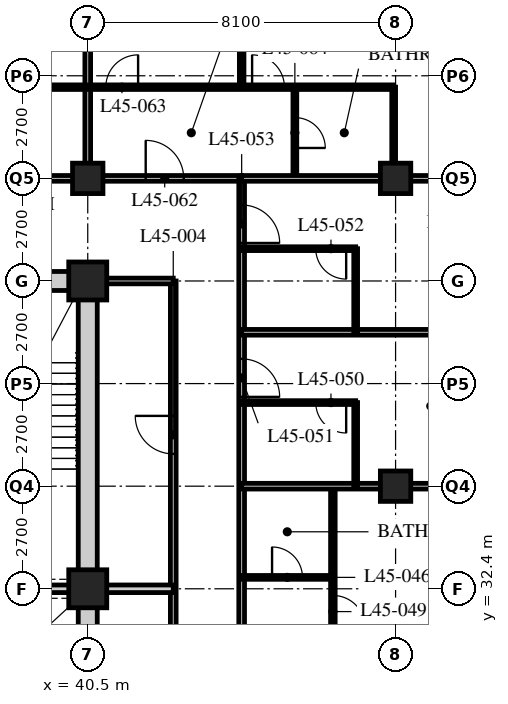
"""IFC4 building model, lengths in metres.
Left out: names, types, materials, properties, quantities, classifications, styles, units other than length and angle.
Written with IfcOpenShell. Run it as: python <this file> out.ifc"""

import sys

from ifc_helpers import new_model, si_unit, direction, frame, frame_2d, origin, origin_2d, place, context, subcontext, project, spatial, rectangle, hollow_rectangle, extrude, element, fill, save


model = new_model("IFC4")
c1 = context("Model", 3, precision=1e-05, world=origin(), true_north=direction((0.0, 1.0)))
c2 = subcontext(c1, "Body", "Model", "MODEL_VIEW")
j1 = project(units=[si_unit("LENGTHUNIT", "METRE"), si_unit("PLANEANGLEUNIT", "RADIAN")], contexts=[c1])
p1 = place(None, origin())
s1 = spatial("IfcSite", under=j1, at=p1, CompositionType="ELEMENT")
p2 = place(p1, origin())
s2 = spatial("IfcBuilding", under=s1, at=p2, CompositionType="ELEMENT")
p3 = place(p2, frame((0.0, 0.0, 177.6)))
s3 = spatial("IfcBuildingStorey", under=s2, at=p3, CompositionType="ELEMENT", Elevation=177.6)
for number, where, z_axis, x_axis in (
    (1, (40.5, 32.4, 0.0), (0.0, 0.0, 1.0), (1.0, 0.0, 0.0)),
    (2, (40.5, 40.5, 0.0), (0.0, 0.0, 1.0), (1.0, 0.0, 0.0)),
):
    element("IfcColumn", number, at=place(p3, frame(where, z_axis=z_axis, x_axis=x_axis)), inside=s3, PredefinedType="COLUMN", context=c2, shape_type="SweptSolid", body=[
        extrude(hollow_rectangle(XDim=1.0, YDim=1.0, WallThickness=0.1, at=origin_2d()), origin(), (0.0, 0.0, 1.0), 3.6),
    ])
for number, where, z_axis, x_axis in (
    (3, (40.5, 43.2, 0.0), (0.0, 0.0, 1.0), (1.0, 0.0, 0.0)),
    (4, (48.6, 35.1, 0.0), (0.0, 0.0, 1.0), (1.0, 0.0, 0.0)),
    (5, (48.6, 43.2, 0.0), (0.0, 0.0, 1.0), (1.0, 0.0, 0.0)),
):
    element("IfcColumn", number, at=place(p3, frame(where, z_axis=z_axis, x_axis=x_axis)), inside=s3, PredefinedType="COLUMN", context=c2, shape_type="SweptSolid", body=[
        extrude(hollow_rectangle(XDim=0.8, YDim=0.8, WallThickness=0.08, at=origin_2d()), origin(), (0.0, 0.0, 1.0), 3.6),
    ])
p4 = place(p3, frame((12.15, 43.2, 0.0), z_axis=(0.0, 0.0, 1.0), x_axis=(1.0, 0.0, 0.0)))
e6 = element("IfcWall", 6, at=p4, inside=s3, PredefinedType="PARTITIONING", context=c2, shape_type="SweptSolid", body=[
    extrude(rectangle(XDim=32.4, YDim=0.15, at=frame_2d((16.2, 0.0))), origin(), (0.0, 0.0, 1.0), 2.778),
])
p5 = place(p4, frame((4.95, 0.0, 0.0)))
e7 = element("IfcOpeningElement", 7, at=p5, cuts=e6, PredefinedType="OPENING", context=c2, shape_type="SweptSolid", body=[
    extrude(rectangle(XDim=1.0, YDim=2.1, at=frame_2d((0.5, 1.05))), frame((0.0, 0.085, 0.0), z_axis=(0.0, -1.0, 0.0), x_axis=(1.0, 0.0, 0.0)), (0.0, 0.0, 1.0), 0.17),
])
p6 = place(p4, frame((13.05, 0.0, 0.0)))
e8 = element("IfcOpeningElement", 8, at=p6, cuts=e6, PredefinedType="OPENING", context=c2, shape_type="SweptSolid", body=[
    extrude(rectangle(XDim=1.0, YDim=2.1, at=frame_2d((0.5, 1.05))), frame((0.0, 0.085, 0.0), z_axis=(0.0, -1.0, 0.0), x_axis=(1.0, 0.0, 0.0)), (0.0, 0.0, 1.0), 0.17),
])
p7 = place(p4, frame((21.15, 0.0, 0.0)))
e9 = element("IfcOpeningElement", 9, at=p7, cuts=e6, PredefinedType="OPENING", context=c2, shape_type="SweptSolid", body=[
    extrude(rectangle(XDim=1.0, YDim=2.1, at=frame_2d((0.5, 1.05))), frame((0.0, 0.085, 0.0), z_axis=(0.0, -1.0, 0.0), x_axis=(1.0, 0.0, 0.0)), (0.0, 0.0, 1.0), 0.17),
])
p8 = place(p4, frame((29.875, 0.0, 0.0)))
e10 = element("IfcOpeningElement", 10, at=p8, cuts=e6, PredefinedType="OPENING", context=c2, shape_type="SweptSolid", body=[
    extrude(rectangle(XDim=1.0, YDim=2.1, at=frame_2d((0.5, 1.05))), frame((0.0, 0.085, 0.0), z_axis=(0.0, -1.0, 0.0), x_axis=(1.0, 0.0, 0.0)), (0.0, 0.0, 1.0), 0.17),
])
p9 = place(p4, frame((1.525, 0.0, 0.0)))
e11 = element("IfcOpeningElement", 11, at=p9, cuts=e6, PredefinedType="OPENING", context=c2, shape_type="SweptSolid", body=[
    extrude(rectangle(XDim=1.0, YDim=2.1, at=frame_2d((0.5, 1.05))), frame((0.0, 0.085, 0.0), z_axis=(0.0, -1.0, 0.0), x_axis=(1.0, 0.0, 0.0)), (0.0, 0.0, 1.0), 0.17),
])
p10 = place(p3, frame((44.55, 18.9, 0.0), z_axis=(0.0, 0.0, 1.0), x_axis=(0.0, 1.0, 0.0)))
e12 = element("IfcWall", 12, at=p10, inside=s3, PredefinedType="PARTITIONING", context=c2, shape_type="SweptSolid", body=[
    extrude(rectangle(XDim=24.3, YDim=0.15, at=frame_2d((12.15, 0.0))), origin(), (0.0, 0.0, 1.0), 3.39),
])
p11 = place(p10, frame((2.35, 0.0, 0.0)))
e13 = element("IfcOpeningElement", 13, at=p11, cuts=e12, PredefinedType="OPENING", context=c2, shape_type="SweptSolid", body=[
    extrude(rectangle(XDim=1.0, YDim=2.1, at=frame_2d((0.5, 1.05))), frame((0.0, 0.085, 0.0), z_axis=(0.0, -1.0, 0.0), x_axis=(1.0, 0.0, 0.0)), (0.0, 0.0, 1.0), 0.17),
])
p12 = place(p10, frame((4.45, 0.0, 0.0)))
e14 = element("IfcOpeningElement", 14, at=p12, cuts=e12, PredefinedType="OPENING", context=c2, shape_type="SweptSolid", body=[
    extrude(rectangle(XDim=1.0, YDim=2.1, at=frame_2d((0.5, 1.05))), frame((0.0, 0.085, 0.0), z_axis=(0.0, -1.0, 0.0), x_axis=(1.0, 0.0, 0.0)), (0.0, 0.0, 1.0), 0.17),
])
p13 = place(p10, frame((18.55, 0.0, 0.0)))
e15 = element("IfcOpeningElement", 15, at=p13, cuts=e12, PredefinedType="OPENING", context=c2, shape_type="SweptSolid", body=[
    extrude(rectangle(XDim=1.0, YDim=2.1, at=frame_2d((0.5, 1.05))), frame((0.0, 0.085, 0.0), z_axis=(0.0, -1.0, 0.0), x_axis=(1.0, 0.0, 0.0)), (0.0, 0.0, 1.0), 0.17),
])
p14 = place(p10, frame((22.6, 0.0, 0.0)))
e16 = element("IfcOpeningElement", 16, at=p14, cuts=e12, PredefinedType="OPENING", context=c2, shape_type="SweptSolid", body=[
    extrude(rectangle(XDim=1.0, YDim=2.1, at=frame_2d((0.5, 1.05))), frame((0.0, 0.085, 0.0), z_axis=(0.0, -1.0, 0.0), x_axis=(1.0, 0.0, 0.0)), (0.0, 0.0, 1.0), 0.17),
])
p15 = place(p3, frame((42.75, 20.7, 0.0), z_axis=(0.0, 0.0, 1.0), x_axis=(0.0, 1.0, 0.0)))
e17 = element("IfcWall", 17, at=p15, inside=s3, PredefinedType="PARTITIONING", context=c2, shape_type="SweptSolid", body=[
    extrude(rectangle(XDim=19.8, YDim=0.15, at=frame_2d((9.9, 0.0))), origin(), (0.0, 0.0, 1.0), 3.39),
])
p16 = place(p15, frame((7.15, 0.0, 0.0)))
e18 = element("IfcOpeningElement", 18, at=p16, cuts=e17, PredefinedType="OPENING", context=c2, shape_type="SweptSolid", body=[
    extrude(rectangle(XDim=1.0, YDim=2.1, at=frame_2d((0.5, 1.05))), frame((0.0, 0.085, 0.0), z_axis=(0.0, -1.0, 0.0), x_axis=(1.0, 0.0, 0.0)), (0.0, 0.0, 1.0), 0.17),
])
p17 = place(p15, frame((15.25, 0.0, 0.0)))
e19 = element("IfcOpeningElement", 19, at=p17, cuts=e17, PredefinedType="OPENING", context=c2, shape_type="SweptSolid", body=[
    extrude(rectangle(XDim=1.0, YDim=2.1, at=frame_2d((0.5, 1.05))), frame((0.0, 0.085, 0.0), z_axis=(0.0, -1.0, 0.0), x_axis=(1.0, 0.0, 0.0)), (0.0, 0.0, 1.0), 0.17),
])
p18 = place(p3, frame((42.75, 40.5, 0.0), z_axis=(0.0, 0.0, 1.0), x_axis=(-1.0, 0.0, 0.0)))
e20 = element("IfcWall", 20, at=p18, inside=s3, PredefinedType="PARTITIONING", context=c2, shape_type="SweptSolid", body=[
    extrude(rectangle(XDim=2.05, YDim=0.15, at=frame_2d((1.025, 0.0))), origin(), (0.0, 0.0, 1.0), 3.39),
])
p19 = place(p3, frame((40.5, 32.4, 0.0), z_axis=(0.0, 0.0, 1.0), x_axis=(1.0, 0.0, 0.0)))
e21 = element("IfcWall", 21, at=p19, inside=s3, PredefinedType="SOLIDWALL", context=c2, shape_type="SweptSolid", body=[
    extrude(rectangle(XDim=2.25, YDim=0.2, at=frame_2d((1.125, 0.0))), origin(), (0.0, 0.0, 1.0), 3.39),
])
p20 = place(p3, frame((46.95, 22.95, 0.0), z_axis=(0.0, 0.0, 1.0), x_axis=(0.0, 1.0, 0.0)))
e22 = element("IfcWall", 22, at=p20, inside=s3, PredefinedType="PARTITIONING", context=c2, shape_type="SweptSolid", body=[
    extrude(rectangle(XDim=12.15, YDim=0.12, at=frame_2d((6.075, 0.0))), origin(), (0.0, 0.0, 1.0), 3.39),
])
p21 = place(p20, frame((0.975, 0.0, 0.0)))
e23 = element("IfcOpeningElement", 23, at=p21, cuts=e22, PredefinedType="OPENING", context=c2, shape_type="SweptSolid", body=[
    extrude(rectangle(XDim=0.85, YDim=2.1, at=frame_2d((0.425, 1.05))), frame((0.0, 0.07, 0.0), z_axis=(0.0, -1.0, 0.0), x_axis=(1.0, 0.0, 0.0)), (0.0, 0.0, 1.0), 0.14),
])
p22 = place(p20, frame((8.425, 0.0, 0.0)))
e24 = element("IfcOpeningElement", 24, at=p22, cuts=e22, PredefinedType="OPENING", context=c2, shape_type="SweptSolid", body=[
    extrude(rectangle(XDim=0.85, YDim=2.1, at=frame_2d((0.425, 1.05))), frame((0.0, 0.07, 0.0), z_axis=(0.0, -1.0, 0.0), x_axis=(1.0, 0.0, 0.0)), (0.0, 0.0, 1.0), 0.14),
])
p23 = place(p3, frame((44.55, 32.7, 0.0), z_axis=(0.0, 0.0, 1.0), x_axis=(1.0, 0.0, 0.0)))
e25 = element("IfcWall", 25, at=p23, inside=s3, PredefinedType="PARTITIONING", context=c2, shape_type="SweptSolid", body=[
    extrude(rectangle(XDim=2.4, YDim=0.1, at=frame_2d((1.2, 0.0))), origin(), (0.0, 0.0, 1.0), 3.39),
])
p24 = place(p23, frame((0.8, 0.0, 0.0)))
e26 = element("IfcOpeningElement", 26, at=p24, cuts=e25, PredefinedType="OPENING", context=c2, shape_type="SweptSolid", body=[
    extrude(rectangle(XDim=0.8, YDim=2.1, at=frame_2d((0.4, 1.05))), frame((0.0, 0.06, 0.0), z_axis=(0.0, -1.0, 0.0), x_axis=(1.0, 0.0, 0.0)), (0.0, 0.0, 1.0), 0.12),
])
p25 = place(p3, frame((44.55, 35.1, 0.0), z_axis=(0.0, 0.0, 1.0), x_axis=(1.0, 0.0, 0.0)))
e27 = element("IfcWall", 27, at=p25, inside=s3, PredefinedType="PARTITIONING", context=c2, shape_type="SweptSolid", body=[
    extrude(rectangle(XDim=11.85, YDim=0.15, at=frame_2d((5.925, 0.0))), origin(), (0.0, 0.0, 1.0), 2.778),
])
p26 = place(p3, frame((47.55, 35.1, 0.0), z_axis=(0.0, 0.0, 1.0), x_axis=(0.0, 1.0, 0.0)))
e28 = element("IfcWall", 28, at=p26, inside=s3, PredefinedType="PARTITIONING", context=c2, shape_type="SweptSolid", body=[
    extrude(rectangle(XDim=2.2, YDim=0.1, at=frame_2d((1.1, 0.0))), origin(), (0.0, 0.0, 1.0), 3.39),
])
p27 = place(p3, frame((44.55, 37.3, 0.0), z_axis=(0.0, 0.0, 1.0), x_axis=(1.0, 0.0, 0.0)))
e29 = element("IfcWall", 29, at=p27, inside=s3, PredefinedType="PARTITIONING", context=c2, shape_type="SweptSolid", body=[
    extrude(rectangle(XDim=3.0, YDim=0.1, at=frame_2d((1.5, 0.0))), origin(), (0.0, 0.0, 1.0), 3.39),
])
p28 = place(p27, frame((1.95, 0.0, 0.0)))
e30 = element("IfcOpeningElement", 30, at=p28, cuts=e29, PredefinedType="OPENING", context=c2, shape_type="SweptSolid", body=[
    extrude(rectangle(XDim=0.8, YDim=2.1, at=frame_2d((0.4, 1.05))), frame((0.0, 0.06, 0.0), z_axis=(0.0, -1.0, 0.0), x_axis=(1.0, 0.0, 0.0)), (0.0, 0.0, 1.0), 0.12),
])
p29 = place(p3, frame((44.55, 39.15, 0.0), z_axis=(0.0, 0.0, 1.0), x_axis=(1.0, 0.0, 0.0)))
e31 = element("IfcWall", 31, at=p29, inside=s3, PredefinedType="PARTITIONING", context=c2, shape_type="SweptSolid", body=[
    extrude(rectangle(XDim=11.85, YDim=0.15, at=frame_2d((5.925, 0.0))), origin(), (0.0, 0.0, 1.0), 3.39),
])
p30 = place(p3, frame((47.55, 39.15, 0.0), z_axis=(0.0, 0.0, 1.0), x_axis=(0.0, 1.0, 0.0)))
e32 = element("IfcWall", 32, at=p30, inside=s3, PredefinedType="PARTITIONING", context=c2, shape_type="SweptSolid", body=[
    extrude(rectangle(XDim=2.2, YDim=0.1, at=frame_2d((1.1, 0.0))), origin(), (0.0, 0.0, 1.0), 3.39),
])
p31 = place(p3, frame((44.55, 41.35, 0.0), z_axis=(0.0, 0.0, 1.0), x_axis=(1.0, 0.0, 0.0)))
e33 = element("IfcWall", 33, at=p31, inside=s3, PredefinedType="PARTITIONING", context=c2, shape_type="SweptSolid", body=[
    extrude(rectangle(XDim=3.0, YDim=0.1, at=frame_2d((1.5, 0.0))), origin(), (0.0, 0.0, 1.0), 3.39),
])
p32 = place(p31, frame((1.95, 0.0, 0.0)))
e34 = element("IfcOpeningElement", 34, at=p32, cuts=e33, PredefinedType="OPENING", context=c2, shape_type="SweptSolid", body=[
    extrude(rectangle(XDim=0.8, YDim=2.1, at=frame_2d((0.4, 1.05))), frame((0.0, 0.06, 0.0), z_axis=(0.0, -1.0, 0.0), x_axis=(1.0, 0.0, 0.0)), (0.0, 0.0, 1.0), 0.12),
])
p33 = place(p3, frame((45.95, 43.2, 0.0), z_axis=(0.0, 0.0, 1.0), x_axis=(0.0, 1.0, 0.0)))
e35 = element("IfcWall", 35, at=p33, inside=s3, PredefinedType="PARTITIONING", context=c2, shape_type="SweptSolid", body=[
    extrude(rectangle(XDim=2.4, YDim=0.1, at=frame_2d((1.2, 0.0))), origin(), (0.0, 0.0, 1.0), 3.39),
])
p34 = place(p33, frame((0.8, 0.0, 0.0)))
e36 = element("IfcOpeningElement", 36, at=p34, cuts=e35, PredefinedType="OPENING", context=c2, shape_type="SweptSolid", body=[
    extrude(rectangle(XDim=0.8, YDim=2.1, at=frame_2d((0.4, 1.05))), frame((0.0, 0.06, 0.0), z_axis=(0.0, -1.0, 0.0), x_axis=(1.0, 0.0, 0.0)), (0.0, 0.0, 1.0), 0.12),
])
p35 = place(p3, frame((48.55, 43.2, 0.0), z_axis=(0.0, 0.0, 1.0), x_axis=(0.0, 1.0, 0.0)))
e37 = element("IfcWall", 37, at=p35, inside=s3, PredefinedType="PARTITIONING", context=c2, shape_type="SweptSolid", body=[
    extrude(rectangle(XDim=2.4, YDim=0.1, at=frame_2d((1.2, 0.0))), origin(), (0.0, 0.0, 1.0), 2.778),
])
p36 = place(p3, frame((44.55, 45.6, 0.0), z_axis=(0.0, 0.0, 1.0), x_axis=(0.0, 1.0, 0.0)))
e38 = element("IfcWall", 38, at=p36, inside=s3, PredefinedType="PARTITIONING", context=c2, shape_type="SweptSolid", body=[
    extrude(rectangle(XDim=13.5, YDim=0.12, at=frame_2d((6.75, 0.0))), origin(), (0.0, 0.0, 1.0), 3.39),
])
p37 = place(p3, frame((44.55, 43.2, 0.0), z_axis=(0.0, 0.0, 1.0), x_axis=(1.0, 0.0, 0.0)))
e39 = element("IfcWall", 39, at=p37, inside=s3, PredefinedType="PARTITIONING", context=c2, shape_type="SweptSolid", body=[
    extrude(rectangle(XDim=11.85, YDim=0.15, at=frame_2d((5.925, 0.0))), origin(), (0.0, 0.0, 1.0), 2.778),
])
p38 = place(p3, frame((40.5, 43.2, 0.0), z_axis=(0.0, 0.0, 1.0), x_axis=(0.0, 1.0, 0.0)))
e40 = element("IfcWall", 40, at=p38, inside=s3, PredefinedType="PARTITIONING", context=c2, shape_type="SweptSolid", body=[
    extrude(rectangle(XDim=15.9, YDim=0.15, at=frame_2d((7.95, 0.0))), origin(), (0.0, 0.0, 1.0), 2.778),
])
p39 = place(p3, frame((8.15, 45.6, 0.0), z_axis=(0.0, 0.0, 1.0), x_axis=(1.0, 0.0, 0.0)))
e41 = element("IfcWall", 41, at=p39, inside=s3, PredefinedType="PARTITIONING", context=c2, shape_type="SweptSolid", body=[
    extrude(rectangle(XDim=40.4, YDim=0.12, at=frame_2d((20.2, 0.0))), origin(), (0.0, 0.0, 1.0), 3.39),
])
p40 = place(p39, frame((9.025, 0.0, 0.0)))
e42 = element("IfcOpeningElement", 42, at=p40, cuts=e41, PredefinedType="OPENING", context=c2, shape_type="SweptSolid", body=[
    extrude(rectangle(XDim=0.85, YDim=2.1, at=frame_2d((0.425, 1.05))), frame((0.0, 0.07, 0.0), z_axis=(0.0, -1.0, 0.0), x_axis=(1.0, 0.0, 0.0)), (0.0, 0.0, 1.0), 0.14),
])
p41 = place(p39, frame((12.425, 0.0, 0.0)))
e43 = element("IfcOpeningElement", 43, at=p41, cuts=e41, PredefinedType="OPENING", context=c2, shape_type="SweptSolid", body=[
    extrude(rectangle(XDim=0.85, YDim=2.1, at=frame_2d((0.425, 1.05))), frame((0.0, 0.07, 0.0), z_axis=(0.0, -1.0, 0.0), x_axis=(1.0, 0.0, 0.0)), (0.0, 0.0, 1.0), 0.14),
])
p42 = place(p39, frame((17.125, 0.0, 0.0)))
e44 = element("IfcOpeningElement", 44, at=p42, cuts=e41, PredefinedType="OPENING", context=c2, shape_type="SweptSolid", body=[
    extrude(rectangle(XDim=0.85, YDim=2.1, at=frame_2d((0.425, 1.05))), frame((0.0, 0.07, 0.0), z_axis=(0.0, -1.0, 0.0), x_axis=(1.0, 0.0, 0.0)), (0.0, 0.0, 1.0), 0.14),
])
p43 = place(p39, frame((20.525, 0.0, 0.0)))
e45 = element("IfcOpeningElement", 45, at=p43, cuts=e41, PredefinedType="OPENING", context=c2, shape_type="SweptSolid", body=[
    extrude(rectangle(XDim=0.85, YDim=2.1, at=frame_2d((0.425, 1.05))), frame((0.0, 0.07, 0.0), z_axis=(0.0, -1.0, 0.0), x_axis=(1.0, 0.0, 0.0)), (0.0, 0.0, 1.0), 0.14),
])
p44 = place(p39, frame((25.225, 0.0, 0.0)))
e46 = element("IfcOpeningElement", 46, at=p44, cuts=e41, PredefinedType="OPENING", context=c2, shape_type="SweptSolid", body=[
    extrude(rectangle(XDim=0.85, YDim=2.1, at=frame_2d((0.425, 1.05))), frame((0.0, 0.07, 0.0), z_axis=(0.0, -1.0, 0.0), x_axis=(1.0, 0.0, 0.0)), (0.0, 0.0, 1.0), 0.14),
])
p45 = place(p39, frame((28.625, 0.0, 0.0)))
e47 = element("IfcOpeningElement", 47, at=p45, cuts=e41, PredefinedType="OPENING", context=c2, shape_type="SweptSolid", body=[
    extrude(rectangle(XDim=0.85, YDim=2.1, at=frame_2d((0.425, 1.05))), frame((0.0, 0.07, 0.0), z_axis=(0.0, -1.0, 0.0), x_axis=(1.0, 0.0, 0.0)), (0.0, 0.0, 1.0), 0.14),
])
p46 = place(p39, frame((32.825, 0.0, 0.0)))
e48 = element("IfcOpeningElement", 48, at=p46, cuts=e41, PredefinedType="OPENING", context=c2, shape_type="SweptSolid", body=[
    extrude(rectangle(XDim=0.85, YDim=2.1, at=frame_2d((0.425, 1.05))), frame((0.0, 0.07, 0.0), z_axis=(0.0, -1.0, 0.0), x_axis=(1.0, 0.0, 0.0)), (0.0, 0.0, 1.0), 0.14),
])
p47 = place(p39, frame((36.675, 0.0, 0.0)))
e49 = element("IfcOpeningElement", 49, at=p47, cuts=e41, PredefinedType="OPENING", context=c2, shape_type="SweptSolid", body=[
    extrude(rectangle(XDim=0.85, YDim=2.1, at=frame_2d((0.425, 1.05))), frame((0.0, 0.07, 0.0), z_axis=(0.0, -1.0, 0.0), x_axis=(1.0, 0.0, 0.0)), (0.0, 0.0, 1.0), 0.14),
])
p48 = place(p39, frame((6.725, 0.0, 0.0)))
e50 = element("IfcOpeningElement", 50, at=p48, cuts=e41, PredefinedType="OPENING", context=c2, shape_type="SweptSolid", body=[
    extrude(rectangle(XDim=0.85, YDim=2.1, at=frame_2d((0.425, 1.05))), frame((0.0, 0.07, 0.0), z_axis=(0.0, -1.0, 0.0), x_axis=(1.0, 0.0, 0.0)), (0.0, 0.0, 1.0), 0.14),
])
p49 = place(p39, frame((2.875, 0.0, 0.0)))
e51 = element("IfcOpeningElement", 51, at=p49, cuts=e41, PredefinedType="OPENING", context=c2, shape_type="SweptSolid", body=[
    extrude(rectangle(XDim=0.85, YDim=2.1, at=frame_2d((0.425, 1.05))), frame((0.0, 0.07, 0.0), z_axis=(0.0, -1.0, 0.0), x_axis=(1.0, 0.0, 0.0)), (0.0, 0.0, 1.0), 0.14),
])
p50 = place(p3, frame((15.95, 40.5, 0.0), z_axis=(0.0, 0.0, 1.0), x_axis=(1.0, 0.0, 0.0)))
e52 = element("IfcWall", 52, at=p50, inside=s3, PredefinedType="SOLIDWALL", context=c2, shape_type="SweptSolid", body=[
    extrude(rectangle(XDim=24.8, YDim=0.5, at=frame_2d((12.4, 0.0))), origin(), (0.0, 0.0, 1.0), 2.74),
])
p51 = place(p50, frame((11.5, 0.0, 0.0)))
e53 = element("IfcOpeningElement", 53, at=p51, cuts=e52, PredefinedType="OPENING", context=c2, shape_type="SweptSolid", body=[
    extrude(rectangle(XDim=1.8, YDim=2.4, at=frame_2d((0.9, 1.2))), frame((0.0, 0.26, 0.0), z_axis=(0.0, -1.0, 0.0), x_axis=(1.0, 0.0, 0.0)), (0.0, 0.0, 1.0), 0.52),
])
p52 = place(p3, frame((40.5, 24.55, 0.0), z_axis=(0.0, 0.0, 1.0), x_axis=(0.0, 1.0, 0.0)))
e54 = element("IfcWall", 54, at=p52, inside=s3, PredefinedType="SOLIDWALL", context=c2, shape_type="SweptSolid", body=[
    extrude(rectangle(XDim=15.7, YDim=0.5, at=frame_2d((7.85, 0.0))), origin(), (0.0, 0.0, 1.0), 2.778),
])
p53 = place(p3, frame((32.3, 32.4, 0.0), z_axis=(0.0, 0.0, 1.0), x_axis=(1.0, 0.0, 0.0)))
e55 = element("IfcWall", 55, at=p53, inside=s3, PredefinedType="SOLIDWALL", context=c2, shape_type="SweptSolid", body=[
    extrude(rectangle(XDim=7.95, YDim=0.2, at=frame_2d((3.975, 0.0))), origin(), (0.0, 0.0, 1.0), 2.778),
])
p54 = place(p17, origin())
e56 = element("IfcDoor", 56, at=p54, inside=s3, OperationType="SINGLE_SWING_RIGHT", PredefinedType="DOOR", context=c2, shape_type="SweptSolid", body=[
    extrude(rectangle(XDim=1.0, YDim=2.1, at=frame_2d((0.5, 1.05))), frame((0.0, 0.025, 0.0), z_axis=(0.0, -1.0, 0.0), x_axis=(1.0, 0.0, 0.0)), (0.0, 0.0, 1.0), 0.05),
])
fill(e19, e56)
p55 = place(p24, origin())
e57 = element("IfcDoor", 57, at=p55, inside=s3, OperationType="SINGLE_SWING_LEFT", PredefinedType="DOOR", context=c2, shape_type="SweptSolid", body=[
    extrude(rectangle(XDim=0.8, YDim=2.1, at=frame_2d((0.4, 1.05))), frame((0.0, 0.025, 0.0), z_axis=(0.0, -1.0, 0.0), x_axis=(1.0, 0.0, 0.0)), (0.0, 0.0, 1.0), 0.05),
])
fill(e26, e57)
p56 = place(p22, origin())
e58 = element("IfcDoor", 58, at=p56, inside=s3, OperationType="SINGLE_SWING_RIGHT", PredefinedType="DOOR", context=c2, shape_type="SweptSolid", body=[
    extrude(rectangle(XDim=0.85, YDim=2.1, at=frame_2d((0.425, 1.05))), frame((0.0, 0.025, 0.0), z_axis=(0.0, -1.0, 0.0), x_axis=(1.0, 0.0, 0.0)), (0.0, 0.0, 1.0), 0.05),
])
fill(e24, e58)
p57 = place(p28, origin())
e59 = element("IfcDoor", 59, at=p57, inside=s3, OperationType="SINGLE_SWING_LEFT", PredefinedType="DOOR", context=c2, shape_type="SweptSolid", body=[
    extrude(rectangle(XDim=0.8, YDim=2.1, at=frame_2d((0.4, 1.05))), frame((0.0, 0.025, 0.0), z_axis=(0.0, -1.0, 0.0), x_axis=(1.0, 0.0, 0.0)), (0.0, 0.0, 1.0), 0.05),
])
fill(e30, e59)
p58 = place(p13, origin())
e60 = element("IfcDoor", 60, at=p58, inside=s3, OperationType="SINGLE_SWING_RIGHT", PredefinedType="DOOR", context=c2, shape_type="SweptSolid", body=[
    extrude(rectangle(XDim=1.0, YDim=2.1, at=frame_2d((0.5, 1.05))), frame((0.0, 0.025, 0.0), z_axis=(0.0, -1.0, 0.0), x_axis=(1.0, 0.0, 0.0)), (0.0, 0.0, 1.0), 0.05),
])
fill(e15, e60)
p59 = place(p32, origin())
e61 = element("IfcDoor", 61, at=p59, inside=s3, OperationType="SINGLE_SWING_LEFT", PredefinedType="DOOR", context=c2, shape_type="SweptSolid", body=[
    extrude(rectangle(XDim=0.8, YDim=2.1, at=frame_2d((0.4, 1.05))), frame((0.0, 0.025, 0.0), z_axis=(0.0, -1.0, 0.0), x_axis=(1.0, 0.0, 0.0)), (0.0, 0.0, 1.0), 0.05),
])
fill(e34, e61)
p60 = place(p14, origin())
e62 = element("IfcDoor", 62, at=p60, inside=s3, OperationType="SINGLE_SWING_RIGHT", PredefinedType="DOOR", context=c2, shape_type="SweptSolid", body=[
    extrude(rectangle(XDim=1.0, YDim=2.1, at=frame_2d((0.5, 1.05))), frame((0.0, 0.025, 0.0), z_axis=(0.0, -1.0, 0.0), x_axis=(1.0, 0.0, 0.0)), (0.0, 0.0, 1.0), 0.05),
])
fill(e16, e62)
p61 = place(p8, origin())
e63 = element("IfcDoor", 63, at=p61, inside=s3, OperationType="SINGLE_SWING_LEFT", PredefinedType="DOOR", context=c2, shape_type="SweptSolid", body=[
    extrude(rectangle(XDim=1.0, YDim=2.1, at=frame_2d((0.5, 1.05))), frame((0.0, 0.025, 0.0), z_axis=(0.0, -1.0, 0.0), x_axis=(1.0, 0.0, 0.0)), (0.0, 0.0, 1.0), 0.05),
])
fill(e10, e63)
p62 = place(p46, origin())
e64 = element("IfcDoor", 64, at=p62, inside=s3, OperationType="SINGLE_SWING_RIGHT", PredefinedType="DOOR", context=c2, shape_type="SweptSolid", body=[
    extrude(rectangle(XDim=0.85, YDim=2.1, at=frame_2d((0.425, 1.05))), frame((0.0, 0.025, 0.0), z_axis=(0.0, -1.0, 0.0), x_axis=(1.0, 0.0, 0.0)), (0.0, 0.0, 1.0), 0.05),
])
fill(e48, e64)
p63 = place(p34, origin())
e65 = element("IfcDoor", 65, at=p63, inside=s3, OperationType="SINGLE_SWING_RIGHT", PredefinedType="DOOR", context=c2, shape_type="SweptSolid", body=[
    extrude(rectangle(XDim=0.8, YDim=2.1, at=frame_2d((0.4, 1.05))), frame((0.0, 0.025, 0.0), z_axis=(0.0, -1.0, 0.0), x_axis=(1.0, 0.0, 0.0)), (0.0, 0.0, 1.0), 0.05),
])
fill(e36, e65)
p64 = place(p47, origin())
e66 = element("IfcDoor", 66, at=p64, inside=s3, OperationType="SINGLE_SWING_LEFT", PredefinedType="DOOR", context=c2, shape_type="SweptSolid", body=[
    extrude(rectangle(XDim=0.85, YDim=2.1, at=frame_2d((0.425, 1.05))), frame((0.0, 0.025, 0.0), z_axis=(0.0, -1.0, 0.0), x_axis=(1.0, 0.0, 0.0)), (0.0, 0.0, 1.0), 0.05),
])
fill(e49, e66)
save(model, sys.argv[1])
